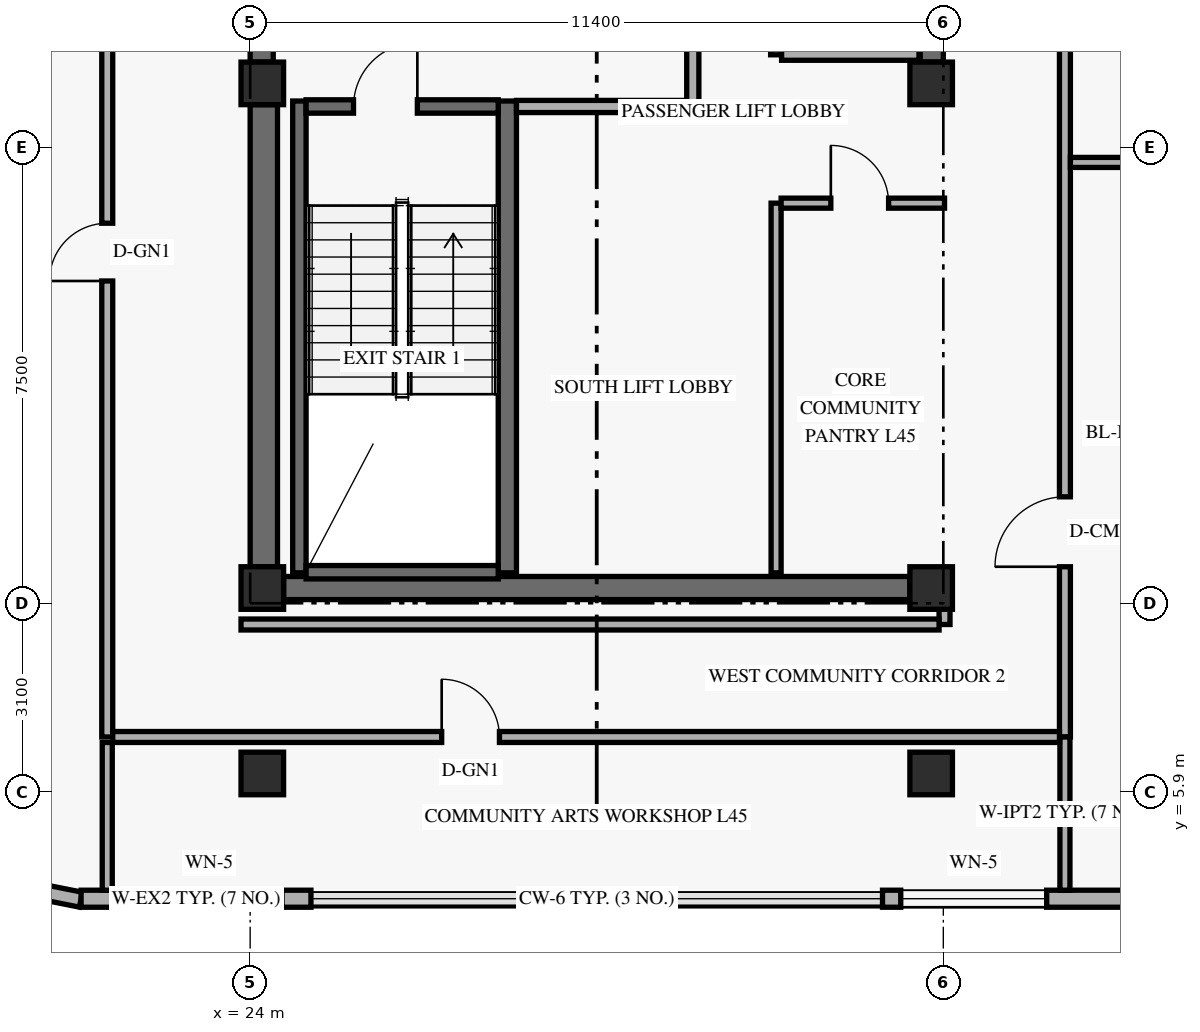
"""IFC4 building model, lengths in metres.
Left out: names, types, materials, properties, quantities, classifications, styles, units other than length and angle.
Written with IfcOpenShell. Run it as: python <this file> out.ifc"""

import sys

from ifc_helpers import new_model, si_unit, direction, frame, frame_2d, origin, origin_2d, place, context, subcontext, project, spatial, rectangle, extrude, element, fill, save


model = new_model("IFC4")
c1 = context("Model", 3, precision=1e-05, world=origin(), true_north=direction((0.0, 1.0)))
c2 = subcontext(c1, "Body", "Model", "MODEL_VIEW")
j1 = project(units=[si_unit("LENGTHUNIT", "METRE"), si_unit("PLANEANGLEUNIT", "RADIAN")], contexts=[c1])
p1 = place(None, origin())
s1 = spatial("IfcSite", under=j1, at=p1, CompositionType="ELEMENT")
p2 = place(p1, origin())
s2 = spatial("IfcBuilding", under=s1, at=p2, CompositionType="ELEMENT")
p3 = place(p2, frame((0.0, 0.0, 173.4)))
s3 = spatial("IfcBuildingStorey", under=s2, at=p3, CompositionType="ELEMENT", Elevation=173.4)
p4 = place(p3, frame((24.225, 9.6, 0.0), z_axis=(0.0, 0.0, 1.0), x_axis=(0.0, 1.0, 0.0)))
e1 = element("IfcWall", 1, at=p4, inside=s3, PredefinedType="SHEAR", context=c2, shape_type="SweptSolid", body=[
    extrude(rectangle(XDim=7.6, YDim=0.45, at=frame_2d((3.8, 0.0))), origin(), (0.0, 0.0, 1.0), 3.348),
])
p5 = place(p3, frame((24.19, 17.9, 0.0), z_axis=(0.0, 0.0, 1.0), x_axis=(0.0, 1.0, 0.0)))
e2 = element("IfcWall", 2, at=p5, inside=s3, PredefinedType="SHEAR", context=c2, shape_type="SweptSolid", body=[
    extrude(rectangle(XDim=11.95, YDim=0.38, at=frame_2d((5.975, 0.0))), origin(), (0.0, 0.0, 1.0), 3.348),
])
p6 = place(p3, frame((35.21, 17.9, 0.0), z_axis=(0.0, 0.0, 1.0), x_axis=(0.0, 1.0, 0.0)))
e3 = element("IfcWall", 3, at=p6, inside=s3, PredefinedType="SHEAR", context=c2, shape_type="SweptSolid", body=[
    extrude(rectangle(XDim=10.2, YDim=0.38, at=frame_2d((5.1, 0.0))), origin(), (0.0, 0.0, 1.0), 3.348),
])
p7 = place(p3, frame((24.55, 9.25, 0.0), z_axis=(0.0, 0.0, 1.0), x_axis=(1.0, 0.0, 0.0)))
e4 = element("IfcWall", 4, at=p7, inside=s3, PredefinedType="SHEAR", context=c2, shape_type="SweptSolid", body=[
    extrude(rectangle(XDim=10.3, YDim=0.38, at=frame_2d((5.15, 0.0))), origin(), (0.0, 0.0, 1.0), 3.96),
])
p8 = place(p3, frame((24.81, 9.5, 0.0), z_axis=(0.0, 0.0, 1.0), x_axis=(0.0, 1.0, 0.0)))
e5 = element("IfcWall", 5, at=p8, inside=s3, PredefinedType="SHEAR", context=c2, shape_type="SweptSolid", body=[
    extrude(rectangle(XDim=7.76, YDim=0.22, at=frame_2d((3.88, 0.0))), origin(), (0.0, 0.0, 1.0), 3.96),
])
p9 = place(p3, frame((28.23, 9.5, 0.0), z_axis=(0.0, 0.0, 1.0), x_axis=(0.0, 1.0, 0.0)))
e6 = element("IfcWall", 6, at=p9, inside=s3, PredefinedType="SHEAR", context=c2, shape_type="SweptSolid", body=[
    extrude(rectangle(XDim=7.76, YDim=0.3, at=frame_2d((3.88, 0.0))), origin(), (0.0, 0.0, 1.0), 3.96),
])
p10 = place(p3, frame((24.92, 9.51, 0.0), z_axis=(0.0, 0.0, 1.0), x_axis=(1.0, 0.0, 0.0)))
e7 = element("IfcWall", 7, at=p10, inside=s3, PredefinedType="SHEAR", context=c2, shape_type="SweptSolid", body=[
    extrude(rectangle(XDim=3.16, YDim=0.22, at=frame_2d((1.58, 0.0))), origin(), (0.0, 0.0, 1.0), 3.96),
])
p11 = place(p3, frame((24.92, 17.17, 0.0), z_axis=(0.0, 0.0, 1.0), x_axis=(1.0, 0.0, 0.0)))
e8 = element("IfcWall", 8, at=p11, inside=s3, PredefinedType="SHEAR", context=c2, shape_type="SweptSolid", body=[
    extrude(rectangle(XDim=3.16, YDim=0.22, at=frame_2d((1.58, 0.0))), origin(), (0.0, 0.0, 1.0), 3.96),
])
p12 = place(p11, frame((0.78, 0.0, 0.0)))
e9 = element("IfcOpeningElement", 9, at=p12, cuts=e8, PredefinedType="OPENING", context=c2, shape_type="SweptSolid", body=[
    extrude(rectangle(XDim=1.05, YDim=2.15, at=frame_2d((0.525, 1.075))), frame((0.0, 0.12, 0.0), z_axis=(0.0, -1.0, 0.0), x_axis=(1.0, 0.0, 0.0)), (0.0, 0.0, 1.0), 0.24),
])
for number, where, z_axis, x_axis in (
    (10, (24.2, 6.2, 0.0), (0.0, 0.0, 1.0), (1.0, 0.0, 0.0)),
    (11, (24.2, 9.25, 0.0), (0.0, 0.0, 1.0), (1.0, 0.0, 0.0)),
    (12, (24.2, 17.55, 0.0), (0.0, 0.0, 1.0), (1.0, 0.0, 0.0)),
    (13, (35.2, 6.2, 0.0), (0.0, 0.0, 1.0), (1.0, 0.0, 0.0)),
    (14, (35.2, 9.25, 0.0), (0.0, 0.0, 1.0), (1.0, 0.0, 0.0)),
    (15, (35.2, 17.55, 0.0), (0.0, 0.0, 1.0), (1.0, 0.0, 0.0)),
):
    element("IfcColumn", number, at=place(p3, frame(where, z_axis=z_axis, x_axis=x_axis)), inside=s3, PredefinedType="COLUMN", context=c2, shape_type="SweptSolid", body=[
        extrude(rectangle(XDim=0.7, YDim=0.7, at=origin_2d()), origin(), (0.0, 0.0, 1.0), 4.2),
    ])
p13 = place(p3, frame((19.854, 4.395, 0.0), z_axis=(0.0, 0.0, 1.0), x_axis=(0.980809899341, -0.19496651342, 0.0)))
e16 = element("IfcWall", 16, at=p13, inside=s3, PredefinedType="SOLIDWALL", context=c2, shape_type="SweptSolid", body=[
    extrude(rectangle(XDim=1.389, YDim=0.25, at=frame_2d((0.694, 0.0))), origin(), (0.0, 0.0, 1.0), 3.96),
])
p14 = place(p3, frame((21.22, 4.14, 0.0), z_axis=(0.0, 0.0, 1.0), x_axis=(1.0, 0.0, 0.0)))
e17 = element("IfcWall", 17, at=p14, inside=s3, PredefinedType="SOLIDWALL", context=c2, shape_type="SweptSolid", body=[
    extrude(rectangle(XDim=3.78, YDim=0.28, at=frame_2d((1.89, 0.0))), origin(), (0.0, 0.0, 1.0), 3.96),
])
p15 = place(p14, frame((0.905, 0.0, 0.85)))
e18 = element("IfcOpeningElement", 18, at=p15, cuts=e17, PredefinedType="OPENING", context=c2, shape_type="SweptSolid", body=[
    extrude(rectangle(XDim=2.4, YDim=1.9, at=frame_2d((1.2, 0.95))), frame((0.0, 0.15, 0.0), z_axis=(0.0, -1.0, 0.0), x_axis=(1.0, 0.0, 0.0)), (0.0, 0.0, 1.0), 0.3),
])
p16 = place(p3, frame((34.4, 4.14, 0.0), z_axis=(0.0, 0.0, 1.0), x_axis=(1.0, 0.0, 0.0)))
e19 = element("IfcWall", 19, at=p16, inside=s3, PredefinedType="SOLIDWALL", context=c2, shape_type="SweptSolid", body=[
    extrude(rectangle(XDim=20.58, YDim=0.28, at=frame_2d((10.29, 0.0))), origin(), (0.0, 0.0, 1.0), 3.96),
])
p17 = place(p16, frame((0.3, 0.0, 0.85)))
e20 = element("IfcOpeningElement", 20, at=p17, cuts=e19, PredefinedType="OPENING", context=c2, shape_type="SweptSolid", body=[
    extrude(rectangle(XDim=2.4, YDim=1.9, at=frame_2d((1.2, 0.95))), frame((0.0, 0.15, 0.0), z_axis=(0.0, -1.0, 0.0), x_axis=(1.0, 0.0, 0.0)), (0.0, 0.0, 1.0), 0.3),
])
p18 = place(p16, frame((10.59, 0.0, 0.85)))
e21 = element("IfcOpeningElement", 21, at=p18, cuts=e19, PredefinedType="OPENING", context=c2, shape_type="SweptSolid", body=[
    extrude(rectangle(XDim=2.4, YDim=1.9, at=frame_2d((1.2, 0.95))), frame((0.0, 0.15, 0.0), z_axis=(0.0, -1.0, 0.0), x_axis=(1.0, 0.0, 0.0)), (0.0, 0.0, 1.0), 0.3),
])
p19 = place(p3, frame((28.38, 17.17, 0.0), z_axis=(0.0, 0.0, 1.0), x_axis=(1.0, 0.0, 0.0)))
e22 = element("IfcWall", 22, at=p19, inside=s3, PredefinedType="STANDARD", context=c2, shape_type="SweptSolid", body=[
    extrude(rectangle(XDim=2.9, YDim=0.2, at=frame_2d((1.45, 0.0))), origin(), (0.0, 0.0, 1.0), 3.96),
])
p20 = place(p3, frame((31.28, 17.07, 0.0), z_axis=(0.0, 0.0, 1.0), x_axis=(0.0, 1.0, 0.0)))
e23 = element("IfcWall", 23, at=p20, inside=s3, PredefinedType="STANDARD", context=c2, shape_type="SweptSolid", body=[
    extrude(rectangle(XDim=3.92, YDim=0.2, at=frame_2d((1.96, 0.0))), origin(), (0.0, 0.0, 1.0), 3.33),
])
p21 = place(p20, frame((1.35, 0.0, 0.0)))
e24 = element("IfcOpeningElement", 24, at=p21, cuts=e23, PredefinedType="OPENING", context=c2, shape_type="SweptSolid", body=[
    extrude(rectangle(XDim=1.2, YDim=2.15, at=frame_2d((0.6, 1.075))), frame((0.0, 0.11, 0.0), z_axis=(0.0, -1.0, 0.0), x_axis=(1.0, 0.0, 0.0)), (0.0, 0.0, 1.0), 0.22),
])
p22 = place(p3, frame((32.65, 18.02, 0.0), z_axis=(0.0, 0.0, 1.0), x_axis=(0.0, 1.0, 0.0)))
e25 = element("IfcWall", 25, at=p22, inside=s3, PredefinedType="STANDARD", context=c2, shape_type="SweptSolid", body=[
    extrude(rectangle(XDim=10.06, YDim=0.18, at=frame_2d((5.03, 0.0))), origin(), (0.0, 0.0, 1.0), 3.96),
])
p23 = place(p3, frame((32.74, 18.02, 0.0), z_axis=(0.0, 0.0, 1.0), x_axis=(1.0, 0.0, 0.0)))
e26 = element("IfcWall", 26, at=p23, inside=s3, PredefinedType="STANDARD", context=c2, shape_type="SweptSolid", body=[
    extrude(rectangle(XDim=2.26, YDim=0.18, at=frame_2d((1.13, 0.0))), origin(), (0.0, 0.0, 1.0), 3.96),
])
p24 = place(p3, frame((37.4, 6.8, 0.0), z_axis=(0.0, 0.0, 1.0), x_axis=(0.0, 1.0, 0.0)))
e27 = element("IfcWall", 27, at=p24, inside=s3, PredefinedType="STANDARD", context=c2, shape_type="SweptSolid", body=[
    extrude(rectangle(XDim=34.4, YDim=0.18, at=frame_2d((17.2, 0.0))), origin(), (0.0, 0.0, 1.0), 3.33),
])
p25 = place(p24, frame((25.43, 0.0, 0.0)))
e28 = element("IfcOpeningElement", 28, at=p25, cuts=e27, PredefinedType="OPENING", context=c2, shape_type="SweptSolid", body=[
    extrude(rectangle(XDim=0.92, YDim=2.14, at=frame_2d((0.46, 1.07))), frame((0.0, 0.1, 0.0), z_axis=(0.0, -1.0, 0.0), x_axis=(1.0, 0.0, 0.0)), (0.0, 0.0, 1.0), 0.2),
])
p26 = place(p24, frame((31.74, 0.0, 0.0)))
e29 = element("IfcOpeningElement", 29, at=p26, cuts=e27, PredefinedType="OPENING", context=c2, shape_type="SweptSolid", body=[
    extrude(rectangle(XDim=0.95, YDim=2.14, at=frame_2d((0.475, 1.07))), frame((0.0, 0.1, 0.0), z_axis=(0.0, -1.0, 0.0), x_axis=(1.0, 0.0, 0.0)), (0.0, 0.0, 1.0), 0.2),
])
p27 = place(p24, frame((2.8, 0.0, 0.0)))
e30 = element("IfcOpeningElement", 30, at=p27, cuts=e27, PredefinedType="OPENING", context=c2, shape_type="SweptSolid", body=[
    extrude(rectangle(XDim=1.15, YDim=2.15, at=frame_2d((0.575, 1.075))), frame((0.0, 0.1, 0.0), z_axis=(0.0, -1.0, 0.0), x_axis=(1.0, 0.0, 0.0)), (0.0, 0.0, 1.0), 0.2),
])
p28 = place(p24, frame((21.6, 0.0, 0.0)))
e31 = element("IfcOpeningElement", 31, at=p28, cuts=e27, PredefinedType="OPENING", context=c2, shape_type="SweptSolid", body=[
    extrude(rectangle(XDim=1.15, YDim=2.15, at=frame_2d((0.575, 1.075))), frame((0.0, 0.1, 0.0), z_axis=(0.0, -1.0, 0.0), x_axis=(1.0, 0.0, 0.0)), (0.0, 0.0, 1.0), 0.2),
])
p29 = place(p3, frame((37.4, 4.28, 0.0), z_axis=(0.0, 0.0, 1.0), x_axis=(0.0, 1.0, 0.0)))
e32 = element("IfcWall", 32, at=p29, inside=s3, PredefinedType="PARTITIONING", context=c2, shape_type="SweptSolid", body=[
    extrude(rectangle(XDim=2.52, YDim=0.165, at=frame_2d((1.26, 0.0))), origin(), (0.0, 0.0, 1.0), 3.479),
])
p30 = place(p3, frame((35.42, 8.65, 0.0), z_axis=(0.0, 0.0, 1.0), x_axis=(0.0, 1.0, 0.0)))
e33 = element("IfcWall", 33, at=p30, inside=s3, PredefinedType="STANDARD", context=c2, shape_type="SweptSolid", body=[
    extrude(rectangle(XDim=0.6, YDim=0.18, at=frame_2d((0.3, 0.0))), origin(), (0.0, 0.0, 1.0), 3.33),
])
p31 = place(p3, frame((37.49, 16.25, 0.0), z_axis=(0.0, 0.0, 1.0), x_axis=(1.0, 0.0, 0.0)))
e34 = element("IfcWall", 34, at=p31, inside=s3, PredefinedType="PARTITIONING", context=c2, shape_type="SweptSolid", body=[
    extrude(rectangle(XDim=20.83, YDim=0.165, at=frame_2d((10.415, 0.0))), origin(), (0.0, 0.0, 1.0), 3.33),
])
p32 = place(p3, frame((32.65, 9.5, 0.0), z_axis=(0.0, 0.0, 1.0), x_axis=(0.0, 1.0, 0.0)))
e35 = element("IfcWall", 35, at=p32, inside=s3, PredefinedType="PARTITIONING", context=c2, shape_type="SweptSolid", body=[
    extrude(rectangle(XDim=6.08, YDim=0.165, at=frame_2d((3.04, 0.0))), origin(), (0.0, 0.0, 1.0), 3.96),
])
p33 = place(p3, frame((32.732, 15.58, 0.0), z_axis=(0.0, 0.0, 1.0), x_axis=(1.0, 0.0, 0.0)))
e36 = element("IfcWall", 36, at=p33, inside=s3, PredefinedType="PARTITIONING", context=c2, shape_type="SweptSolid", body=[
    extrude(rectangle(XDim=2.688, YDim=0.165, at=frame_2d((1.344, 0.0))), origin(), (0.0, 0.0, 1.0), 3.33),
])
p34 = place(p33, frame((0.817, 0.0, 0.0)))
e37 = element("IfcOpeningElement", 37, at=p34, cuts=e36, PredefinedType="OPENING", context=c2, shape_type="SweptSolid", body=[
    extrude(rectangle(XDim=0.95, YDim=2.15, at=frame_2d((0.475, 1.075))), frame((0.0, 0.093, 0.0), z_axis=(0.0, -1.0, 0.0), x_axis=(1.0, 0.0, 0.0)), (0.0, 0.0, 1.0), 0.185),
])
p35 = place(p3, frame((21.65, 6.8, 0.0), z_axis=(0.0, 0.0, 1.0), x_axis=(0.0, 1.0, 0.0)))
e38 = element("IfcWall", 38, at=p35, inside=s3, PredefinedType="STANDARD", context=c2, shape_type="SweptSolid", body=[
    extrude(rectangle(XDim=34.4, YDim=0.18, at=frame_2d((17.2, 0.0))), origin(), (0.0, 0.0, 1.0), 3.33),
])
p36 = place(p35, frame((7.5, 0.0, 0.0)))
e39 = element("IfcOpeningElement", 39, at=p36, cuts=e38, PredefinedType="OPENING", context=c2, shape_type="SweptSolid", body=[
    extrude(rectangle(XDim=0.95, YDim=2.15, at=frame_2d((0.475, 1.075))), frame((0.0, 0.1, 0.0), z_axis=(0.0, -1.0, 0.0), x_axis=(1.0, 0.0, 0.0)), (0.0, 0.0, 1.0), 0.2),
])
p37 = place(p35, frame((22.5, 0.0, 0.0)))
e40 = element("IfcOpeningElement", 40, at=p37, cuts=e38, PredefinedType="OPENING", context=c2, shape_type="SweptSolid", body=[
    extrude(rectangle(XDim=0.95, YDim=2.15, at=frame_2d((0.475, 1.075))), frame((0.0, 0.1, 0.0), z_axis=(0.0, -1.0, 0.0), x_axis=(1.0, 0.0, 0.0)), (0.0, 0.0, 1.0), 0.2),
])
p38 = place(p3, frame((21.74, 6.8, 0.0), z_axis=(0.0, 0.0, 1.0), x_axis=(1.0, 0.0, 0.0)))
e41 = element("IfcWall", 41, at=p38, inside=s3, PredefinedType="STANDARD", context=c2, shape_type="SweptSolid", body=[
    extrude(rectangle(XDim=15.57, YDim=0.18, at=frame_2d((7.785, 0.0))), origin(), (0.0, 0.0, 1.0), 3.33),
])
p39 = place(p38, frame((5.41, 0.0, 0.0)))
e42 = element("IfcOpeningElement", 42, at=p39, cuts=e41, PredefinedType="OPENING", context=c2, shape_type="SweptSolid", body=[
    extrude(rectangle(XDim=0.95, YDim=2.15, at=frame_2d((0.475, 1.075))), frame((0.0, 0.1, 0.0), z_axis=(0.0, -1.0, 0.0), x_axis=(1.0, 0.0, 0.0)), (0.0, 0.0, 1.0), 0.2),
])
p40 = place(p3, frame((23.85, 8.65, 0.0), z_axis=(0.0, 0.0, 1.0), x_axis=(1.0, 0.0, 0.0)))
e43 = element("IfcWall", 43, at=p40, inside=s3, PredefinedType="STANDARD", context=c2, shape_type="SweptSolid", body=[
    extrude(rectangle(XDim=11.48, YDim=0.18, at=frame_2d((5.74, 0.0))), origin(), (0.0, 0.0, 1.0), 3.33),
])
p41 = place(p3, frame((21.65, 4.28, 0.0), z_axis=(0.0, 0.0, 1.0), x_axis=(0.0, 1.0, 0.0)))
e44 = element("IfcWall", 44, at=p41, inside=s3, PredefinedType="PARTITIONING", context=c2, shape_type="SweptSolid", body=[
    extrude(rectangle(XDim=2.43, YDim=0.165, at=frame_2d((1.215, 0.0))), origin(), (0.0, 0.0, 1.0), 3.479),
])
p42 = place(p15, origin())
e45 = element("IfcWindow", 45, at=p42, inside=s3, PartitioningType="SINGLE_PANEL", PredefinedType="WINDOW", context=c2, shape_type="SweptSolid", body=[
    extrude(rectangle(XDim=2.4, YDim=1.9, at=frame_2d((1.2, 0.95))), frame((0.0, 0.03, 0.0), z_axis=(0.0, -1.0, 0.0), x_axis=(1.0, 0.0, 0.0)), (0.0, 0.0, 1.0), 0.06),
])
fill(e18, e45)
p43 = place(p17, origin())
e46 = element("IfcWindow", 46, at=p43, inside=s3, PartitioningType="SINGLE_PANEL", PredefinedType="WINDOW", context=c2, shape_type="SweptSolid", body=[
    extrude(rectangle(XDim=2.4, YDim=1.9, at=frame_2d((1.2, 0.95))), frame((0.0, 0.03, 0.0), z_axis=(0.0, -1.0, 0.0), x_axis=(1.0, 0.0, 0.0)), (0.0, 0.0, 1.0), 0.06),
])
fill(e20, e46)
p44 = place(p12, frame((1.05, 0.0, 0.0), z_axis=(0.0, 0.0, 1.0), x_axis=(-1.0, 0.0, 0.0)))
e47 = element("IfcDoor", 47, at=p44, inside=s3, OperationType="SINGLE_SWING_LEFT", PredefinedType="DOOR", context=c2, shape_type="SweptSolid", body=[
    extrude(rectangle(XDim=1.05, YDim=2.15, at=frame_2d((0.525, 1.075))), frame((0.0, 0.025, 0.0), z_axis=(0.0, -1.0, 0.0), x_axis=(1.0, 0.0, 0.0)), (0.0, 0.0, 1.0), 0.05),
])
fill(e9, e47)
p45 = place(p34, origin())
e48 = element("IfcDoor", 48, at=p45, inside=s3, OperationType="SINGLE_SWING_LEFT", PredefinedType="DOOR", context=c2, shape_type="SweptSolid", body=[
    extrude(rectangle(XDim=0.95, YDim=2.15, at=frame_2d((0.475, 1.075))), frame((0.0, 0.025, 0.0), z_axis=(0.0, -1.0, 0.0), x_axis=(1.0, 0.0, 0.0)), (0.0, 0.0, 1.0), 0.05),
])
fill(e37, e48)
p46 = place(p27, origin())
e49 = element("IfcDoor", 49, at=p46, inside=s3, OperationType="SINGLE_SWING_LEFT", PredefinedType="DOOR", context=c2, shape_type="SweptSolid", body=[
    extrude(rectangle(XDim=1.15, YDim=2.15, at=frame_2d((0.575, 1.075))), frame((0.0, 0.025, 0.0), z_axis=(0.0, -1.0, 0.0), x_axis=(1.0, 0.0, 0.0)), (0.0, 0.0, 1.0), 0.05),
])
fill(e30, e49)
p47 = place(p36, origin())
e50 = element("IfcDoor", 50, at=p47, inside=s3, OperationType="SINGLE_SWING_LEFT", PredefinedType="DOOR", context=c2, shape_type="SweptSolid", body=[
    extrude(rectangle(XDim=0.95, YDim=2.15, at=frame_2d((0.475, 1.075))), frame((0.0, 0.025, 0.0), z_axis=(0.0, -1.0, 0.0), x_axis=(1.0, 0.0, 0.0)), (0.0, 0.0, 1.0), 0.05),
])
fill(e39, e50)
p48 = place(p39, origin())
e51 = element("IfcDoor", 51, at=p48, inside=s3, OperationType="SINGLE_SWING_LEFT", PredefinedType="DOOR", context=c2, shape_type="SweptSolid", body=[
    extrude(rectangle(XDim=0.95, YDim=2.15, at=frame_2d((0.475, 1.075))), frame((0.0, 0.025, 0.0), z_axis=(0.0, -1.0, 0.0), x_axis=(1.0, 0.0, 0.0)), (0.0, 0.0, 1.0), 0.05),
])
fill(e42, e51)
save(model, sys.argv[1])
